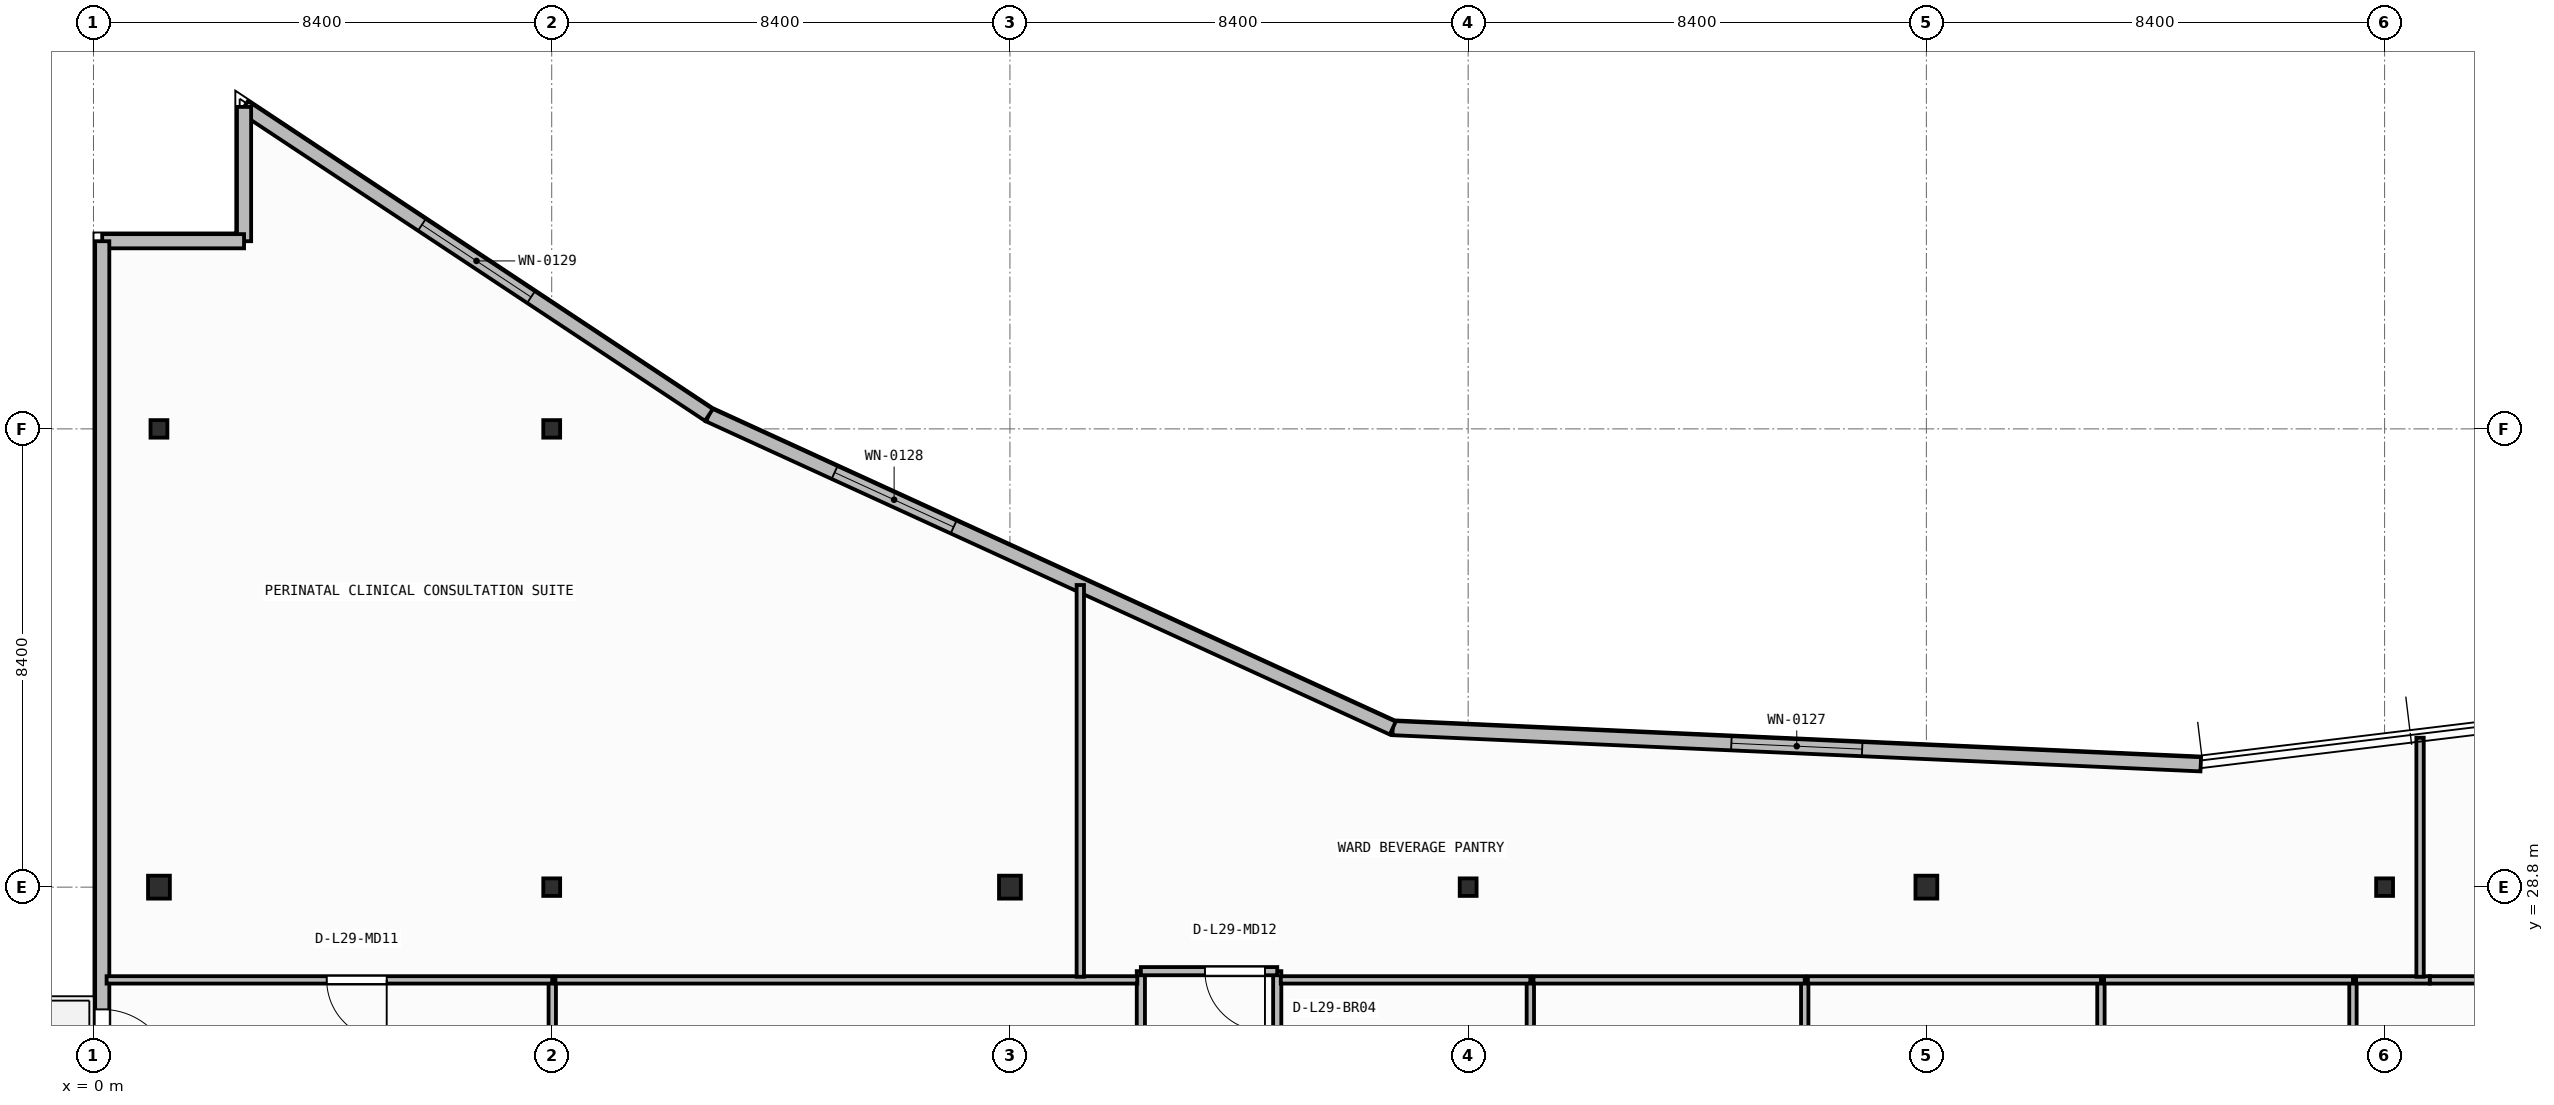
"""IFC4 building model, lengths in metres.
Left out: names, types, materials, properties, quantities, classifications, styles, units other than length and angle.
Written with IfcOpenShell. Run it as: python <this file> out.ifc"""

import sys

from ifc_helpers import new_model, si_unit, direction, frame, frame_2d, origin, origin_2d, place, context, subcontext, project, spatial, rectangle, i_section, extrude, element, fill, save


model = new_model("IFC4")
c1 = context("Model", 3, precision=1e-05, world=origin(), true_north=direction((0.0, 1.0)))
c2 = subcontext(c1, "Body", "Model", "MODEL_VIEW")
j1 = project(units=[si_unit("LENGTHUNIT", "METRE"), si_unit("PLANEANGLEUNIT", "RADIAN")], contexts=[c1])
p1 = place(None, origin())
s1 = spatial("IfcSite", under=j1, at=p1, CompositionType="ELEMENT")
p2 = place(p1, origin())
s2 = spatial("IfcBuilding", under=s1, at=p2, CompositionType="ELEMENT")
p3 = place(p2, frame((0.0, 0.0, 119.15)))
s3 = spatial("IfcBuildingStorey", under=s2, at=p3, CompositionType="ELEMENT", Elevation=119.15)
p4 = place(p3, frame((1.2, 28.8, 0.0), z_axis=(0.0, 0.0, 1.0), x_axis=(1.0, 0.0, 0.0)))
e1 = element("IfcColumn", 1, at=p4, inside=s3, PredefinedType="COLUMN", context=c2, shape_type="SweptSolid", body=[
    extrude(i_section(OverallWidth=0.4, OverallDepth=0.42, WebThickness=0.025, FlangeThickness=0.04, at=origin_2d()), origin(), (0.0, 0.0, 1.0), 3.95),
])
p5 = place(p3, frame((8.4, 28.8, 0.0), z_axis=(0.0, 0.0, 1.0), x_axis=(1.0, 0.0, 0.0)))
e2 = element("IfcColumn", 2, at=p5, inside=s3, PredefinedType="COLUMN", context=c2, shape_type="SweptSolid", body=[
    extrude(i_section(OverallWidth=0.309, OverallDepth=0.321, WebThickness=0.014, FlangeThickness=0.022, FilletRadius=0.017, at=origin_2d()), origin(), (0.0, 0.0, 1.0), 3.95),
])
p6 = place(p3, frame((16.8, 28.8, 0.0), z_axis=(0.0, 0.0, 1.0), x_axis=(1.0, 0.0, 0.0)))
e3 = element("IfcColumn", 3, at=p6, inside=s3, PredefinedType="COLUMN", context=c2, shape_type="SweptSolid", body=[
    extrude(i_section(OverallWidth=0.4, OverallDepth=0.42, WebThickness=0.025, FlangeThickness=0.04, at=origin_2d()), origin(), (0.0, 0.0, 1.0), 3.95),
])
p7 = place(p3, frame((25.2, 28.8, 0.0), z_axis=(0.0, 0.0, 1.0), x_axis=(1.0, 0.0, 0.0)))
e4 = element("IfcColumn", 4, at=p7, inside=s3, PredefinedType="COLUMN", context=c2, shape_type="SweptSolid", body=[
    extrude(i_section(OverallWidth=0.309, OverallDepth=0.321, WebThickness=0.014, FlangeThickness=0.022, FilletRadius=0.017, at=origin_2d()), origin(), (0.0, 0.0, 1.0), 3.95),
])
p8 = place(p3, frame((33.6, 28.8, 0.0), z_axis=(0.0, 0.0, 1.0), x_axis=(1.0, 0.0, 0.0)))
e5 = element("IfcColumn", 5, at=p8, inside=s3, PredefinedType="COLUMN", context=c2, shape_type="SweptSolid", body=[
    extrude(i_section(OverallWidth=0.4, OverallDepth=0.42, WebThickness=0.025, FlangeThickness=0.04, at=origin_2d()), origin(), (0.0, 0.0, 1.0), 3.95),
])
for number, where, z_axis, x_axis in (
    (6, (42.0, 28.8, 0.0), (0.0, 0.0, 1.0), (1.0, 0.0, 0.0)),
    (7, (1.2, 37.2, 0.0), (0.0, 0.0, 1.0), (1.0, 0.0, 0.0)),
    (8, (8.4, 37.2, 0.0), (0.0, 0.0, 1.0), (1.0, 0.0, 0.0)),
):
    element("IfcColumn", number, at=place(p3, frame(where, z_axis=z_axis, x_axis=x_axis)), inside=s3, PredefinedType="COLUMN", context=c2, shape_type="SweptSolid", body=[
        extrude(i_section(OverallWidth=0.309, OverallDepth=0.321, WebThickness=0.014, FlangeThickness=0.022, FilletRadius=0.017, at=origin_2d()), origin(), (0.0, 0.0, 1.0), 3.95),
    ])
p9 = place(p3, frame((38.63, 31.052, 0.0), z_axis=(0.0, 0.0, 1.0), x_axis=(-0.998996592956, 0.044786239663, 0.0)))
e9 = element("IfcWall", 9, at=p9, inside=s3, PredefinedType="STANDARD", context=c2, shape_type="SweptSolid", body=[
    extrude(rectangle(XDim=14.827, YDim=0.26, at=frame_2d((7.414, 0.0))), origin(), (0.0, 0.0, 1.0), 3.71),
])
p10 = place(p9, frame((6.214, 0.0, 0.9)))
e10 = element("IfcOpeningElement", 10, at=p10, cuts=e9, PredefinedType="OPENING", context=c2, shape_type="SweptSolid", body=[
    extrude(rectangle(XDim=2.4, YDim=1.65, at=frame_2d((1.2, 0.825))), frame((0.0, 0.14, 0.0), z_axis=(0.0, -1.0, 0.0), x_axis=(1.0, 0.0, 0.0)), (0.0, 0.0, 1.0), 0.28),
])
p11 = place(p3, frame((23.818, 31.716, 0.0), z_axis=(0.0, 0.0, 1.0), x_axis=(-0.909209527513, 0.416338846471, 0.0)))
e11 = element("IfcWall", 11, at=p11, inside=s3, PredefinedType="STANDARD", context=c2, shape_type="SweptSolid", body=[
    extrude(rectangle(XDim=13.787, YDim=0.26, at=frame_2d((6.894, 0.0))), origin(), (0.0, 0.0, 1.0), 3.71),
])
p12 = place(p11, frame((8.854, 0.0, 0.9)))
e12 = element("IfcOpeningElement", 12, at=p12, cuts=e11, PredefinedType="OPENING", context=c2, shape_type="SweptSolid", body=[
    extrude(rectangle(XDim=2.4, YDim=1.65, at=frame_2d((1.2, 0.825))), frame((0.0, 0.14, 0.0), z_axis=(0.0, -1.0, 0.0), x_axis=(1.0, 0.0, 0.0)), (0.0, 0.0, 1.0), 0.28),
])
p13 = place(p3, frame((11.282, 37.456, 0.0), z_axis=(0.0, 0.0, 1.0), x_axis=(-0.833630474253, 0.552322580017, 0.0)))
e13 = element("IfcWall", 13, at=p13, inside=s3, PredefinedType="STANDARD", context=c2, shape_type="SweptSolid", body=[
    extrude(rectangle(XDim=10.223, YDim=0.26, at=frame_2d((5.111, 0.0))), origin(), (0.0, 0.0, 1.0), 3.71),
])
p14 = place(p13, frame((3.911, 0.0, 0.9)))
e14 = element("IfcOpeningElement", 14, at=p14, cuts=e13, PredefinedType="OPENING", context=c2, shape_type="SweptSolid", body=[
    extrude(rectangle(XDim=2.4, YDim=1.65, at=frame_2d((1.2, 0.825))), frame((0.0, 0.14, 0.0), z_axis=(0.0, -1.0, 0.0), x_axis=(1.0, 0.0, 0.0)), (0.0, 0.0, 1.0), 0.28),
])
p15 = place(p3, frame((2.76, 43.102, 0.0), z_axis=(0.0, 0.0, 1.0), x_axis=(0.0, -1.0, 0.0)))
e15 = element("IfcWall", 15, at=p15, inside=s3, PredefinedType="STANDARD", context=c2, shape_type="SweptSolid", body=[
    extrude(rectangle(XDim=2.462, YDim=0.26, at=frame_2d((1.231, 0.0))), origin(), (0.0, 0.0, 1.0), 3.71),
])
p16 = place(p3, frame((2.76, 40.64, 0.0), z_axis=(0.0, 0.0, 1.0), x_axis=(-1.0, 0.0, 0.0)))
e16 = element("IfcWall", 16, at=p16, inside=s3, PredefinedType="STANDARD", context=c2, shape_type="SweptSolid", body=[
    extrude(rectangle(XDim=2.6, YDim=0.26, at=frame_2d((1.3, 0.0))), origin(), (0.0, 0.0, 1.0), 3.71),
])
p17 = place(p3, frame((0.16, 40.64, 0.0), z_axis=(0.0, 0.0, 1.0), x_axis=(0.0, -1.0, 0.0)))
e17 = element("IfcWall", 17, at=p17, inside=s3, PredefinedType="STANDARD", context=c2, shape_type="SweptSolid", body=[
    extrude(rectangle(XDim=37.88, YDim=0.26, at=frame_2d((18.94, 0.0))), origin(), (0.0, 0.0, 1.0), 3.71),
])
p18 = place(p17, frame((14.081, 0.0, 0.0)))
e18 = element("IfcOpeningElement", 18, at=p18, cuts=e17, PredefinedType="OPENING", context=c2, shape_type="SweptSolid", body=[
    extrude(rectangle(XDim=1.3, YDim=2.15, at=frame_2d((0.65, 1.075))), frame((0.0, 0.14, 0.0), z_axis=(0.0, -1.0, 0.0), x_axis=(1.0, 0.0, 0.0)), (0.0, 0.0, 1.0), 0.28),
])
p19 = place(p17, frame((21.856, 0.0, 0.9)))
e19 = element("IfcOpeningElement", 19, at=p19, cuts=e17, PredefinedType="OPENING", context=c2, shape_type="SweptSolid", body=[
    extrude(rectangle(XDim=2.4, YDim=1.65, at=frame_2d((1.2, 0.825))), frame((0.0, 0.14, 0.0), z_axis=(0.0, -1.0, 0.0), x_axis=(1.0, 0.0, 0.0)), (0.0, 0.0, 1.0), 0.28),
])
p20 = place(p3, frame((19.2, 27.26, 0.0), z_axis=(0.0, 0.0, 1.0), x_axis=(0.0, -1.0, 0.0)))
e20 = element("IfcWall", 20, at=p20, inside=s3, PredefinedType="PARTITIONING", context=c2, shape_type="SweptSolid", body=[
    extrude(rectangle(XDim=6.482, YDim=0.15, at=frame_2d((3.241, 0.0))), origin(), (0.0, 0.0, 1.0), 3.71),
])
p21 = place(p20, frame((2.068, 0.0, 0.0)))
e21 = element("IfcOpeningElement", 21, at=p21, cuts=e20, PredefinedType="OPENING", context=c2, shape_type="SweptSolid", body=[
    extrude(rectangle(XDim=1.1, YDim=2.1, at=frame_2d((0.55, 1.05))), frame((0.0, 0.085, 0.0), z_axis=(0.0, -1.0, 0.0), x_axis=(1.0, 0.0, 0.0)), (0.0, 0.0, 1.0), 0.17),
])
p22 = place(p3, frame((21.7, 23.784, 0.0), z_axis=(0.0, 0.0, 1.0), x_axis=(0.0, 1.0, 0.0)))
e22 = element("IfcWall", 22, at=p22, inside=s3, PredefinedType="PARTITIONING", context=c2, shape_type="SweptSolid", body=[
    extrude(rectangle(XDim=3.476, YDim=0.15, at=frame_2d((1.738, 0.0))), origin(), (0.0, 0.0, 1.0), 3.71),
])
p23 = place(p22, frame((1.088, 0.0, 0.0)))
e23 = element("IfcOpeningElement", 23, at=p23, cuts=e22, PredefinedType="OPENING", context=c2, shape_type="SweptSolid", body=[
    extrude(rectangle(XDim=1.3, YDim=2.15, at=frame_2d((0.65, 1.075))), frame((0.0, 0.085, 0.0), z_axis=(0.0, -1.0, 0.0), x_axis=(1.0, 0.0, 0.0)), (0.0, 0.0, 1.0), 0.17),
])
p24 = place(p3, frame((21.7, 27.26, 0.0), z_axis=(0.0, 0.0, 1.0), x_axis=(-1.0, 0.0, 0.0)))
e24 = element("IfcWall", 24, at=p24, inside=s3, PredefinedType="PARTITIONING", context=c2, shape_type="SweptSolid", body=[
    extrude(rectangle(XDim=2.5, YDim=0.15, at=frame_2d((1.25, 0.0))), origin(), (0.0, 0.0, 1.0), 3.71),
])
p25 = place(p24, frame((0.225, 0.0, 0.0)))
e25 = element("IfcOpeningElement", 25, at=p25, cuts=e24, PredefinedType="OPENING", context=c2, shape_type="SweptSolid", body=[
    extrude(rectangle(XDim=1.1, YDim=2.1, at=frame_2d((0.55, 1.05))), frame((0.0, 0.085, 0.0), z_axis=(0.0, -1.0, 0.0), x_axis=(1.0, 0.0, 0.0)), (0.0, 0.0, 1.0), 0.17),
])
p26 = place(p3, frame((8.41, 20.607, 0.0), z_axis=(0.0, 0.0, 1.0), x_axis=(0.0, 1.0, 0.0)))
e26 = element("IfcWall", 26, at=p26, inside=s3, PredefinedType="PARTITIONING", context=c2, shape_type="SweptSolid", body=[
    extrude(rectangle(XDim=6.493, YDim=0.135, at=frame_2d((3.246, 0.0))), origin(), (0.0, 0.0, 1.0), 3.152),
])
p27 = place(p3, frame((8.41, 27.1, 0.0), z_axis=(0.0, 0.0, 1.0), x_axis=(-1.0, 0.0, 0.0)))
e27 = element("IfcWall", 27, at=p27, inside=s3, PredefinedType="PARTITIONING", context=c2, shape_type="SweptSolid", body=[
    extrude(rectangle(XDim=8.17, YDim=0.135, at=frame_2d((4.085, 0.0))), origin(), (0.0, 0.0, 1.0), 3.71),
])
p28 = place(p27, frame((3.035, 0.0, 0.0)))
e28 = element("IfcOpeningElement", 28, at=p28, cuts=e27, PredefinedType="OPENING", context=c2, shape_type="SweptSolid", body=[
    extrude(rectangle(XDim=1.1, YDim=2.1, at=frame_2d((0.55, 1.05))), frame((0.0, 0.077, 0.0), z_axis=(0.0, -1.0, 0.0), x_axis=(1.0, 0.0, 0.0)), (0.0, 0.0, 1.0), 0.155),
])
p29 = place(p3, frame((19.135, 27.1, 0.0), z_axis=(0.0, 0.0, 1.0), x_axis=(-1.0, 0.0, 0.0)))
e29 = element("IfcWall", 29, at=p29, inside=s3, PredefinedType="PARTITIONING", context=c2, shape_type="SweptSolid", body=[
    extrude(rectangle(XDim=10.667, YDim=0.135, at=frame_2d((5.334, 0.0))), origin(), (0.0, 0.0, 1.0), 3.71),
])
p30 = place(p3, frame((26.34, 23.802, 0.0), z_axis=(0.0, 0.0, 1.0), x_axis=(0.0, 1.0, 0.0)))
e30 = element("IfcWall", 30, at=p30, inside=s3, PredefinedType="PARTITIONING", context=c2, shape_type="SweptSolid", body=[
    extrude(rectangle(XDim=3.298, YDim=0.135, at=frame_2d((1.649, 0.0))), origin(), (0.0, 0.0, 1.0), 3.71),
])
p31 = place(p3, frame((26.34, 27.1, 0.0), z_axis=(0.0, 0.0, 1.0), x_axis=(-1.0, 0.0, 0.0)))
e31 = element("IfcWall", 31, at=p31, inside=s3, PredefinedType="PARTITIONING", context=c2, shape_type="SweptSolid", body=[
    extrude(rectangle(XDim=4.575, YDim=0.135, at=frame_2d((2.288, 0.0))), origin(), (0.0, 0.0, 1.0), 3.71),
])
p32 = place(p3, frame((31.37, 23.802, 0.0), z_axis=(0.0, 0.0, 1.0), x_axis=(0.0, 1.0, 0.0)))
e32 = element("IfcWall", 32, at=p32, inside=s3, PredefinedType="PARTITIONING", context=c2, shape_type="SweptSolid", body=[
    extrude(rectangle(XDim=3.298, YDim=0.135, at=frame_2d((1.649, 0.0))), origin(), (0.0, 0.0, 1.0), 3.71),
])
p33 = place(p3, frame((31.37, 27.1, 0.0), z_axis=(0.0, 0.0, 1.0), x_axis=(-1.0, 0.0, 0.0)))
e33 = element("IfcWall", 33, at=p33, inside=s3, PredefinedType="PARTITIONING", context=c2, shape_type="SweptSolid", body=[
    extrude(rectangle(XDim=4.973, YDim=0.135, at=frame_2d((2.486, 0.0))), origin(), (0.0, 0.0, 1.0), 3.71),
])
p34 = place(p3, frame((36.8, 20.715, 0.0), z_axis=(0.0, 0.0, 1.0), x_axis=(0.0, 1.0, 0.0)))
e34 = element("IfcWall", 34, at=p34, inside=s3, PredefinedType="PARTITIONING", context=c2, shape_type="SweptSolid", body=[
    extrude(rectangle(XDim=6.385, YDim=0.135, at=frame_2d((3.192, 0.0))), origin(), (0.0, 0.0, 1.0), 3.71),
])
p35 = place(p3, frame((36.8, 27.1, 0.0), z_axis=(0.0, 0.0, 1.0), x_axis=(-1.0, 0.0, 0.0)))
e35 = element("IfcWall", 35, at=p35, inside=s3, PredefinedType="PARTITIONING", context=c2, shape_type="SweptSolid", body=[
    extrude(rectangle(XDim=5.373, YDim=0.135, at=frame_2d((2.686, 0.0))), origin(), (0.0, 0.0, 1.0), 3.71),
])
p36 = place(p3, frame((41.42, 20.715, 0.0), z_axis=(0.0, 0.0, 1.0), x_axis=(0.0, 1.0, 0.0)))
e36 = element("IfcWall", 36, at=p36, inside=s3, PredefinedType="PARTITIONING", context=c2, shape_type="SweptSolid", body=[
    extrude(rectangle(XDim=6.385, YDim=0.135, at=frame_2d((3.192, 0.0))), origin(), (0.0, 0.0, 1.0), 3.71),
])
p37 = place(p3, frame((41.42, 27.1, 0.0), z_axis=(0.0, 0.0, 1.0), x_axis=(-1.0, 0.0, 0.0)))
e37 = element("IfcWall", 37, at=p37, inside=s3, PredefinedType="PARTITIONING", context=c2, shape_type="SweptSolid", body=[
    extrude(rectangle(XDim=4.562, YDim=0.135, at=frame_2d((2.281, 0.0))), origin(), (0.0, 0.0, 1.0), 3.71),
])
p38 = place(p3, frame((42.829, 27.1, 0.0), z_axis=(0.0, 0.0, 1.0), x_axis=(-1.0, 0.0, 0.0)))
e38 = element("IfcWall", 38, at=p38, inside=s3, PredefinedType="PARTITIONING", context=c2, shape_type="SweptSolid", body=[
    extrude(rectangle(XDim=1.351, YDim=0.135, at=frame_2d((0.676, 0.0))), origin(), (0.0, 0.0, 1.0), 3.71),
])
p39 = place(p3, frame((46.45, 27.1, 0.0), z_axis=(0.0, 0.0, 1.0), x_axis=(-1.0, 0.0, 0.0)))
e39 = element("IfcWall", 39, at=p39, inside=s3, PredefinedType="PARTITIONING", context=c2, shape_type="SweptSolid", body=[
    extrude(rectangle(XDim=3.619, YDim=0.135, at=frame_2d((1.81, 0.0))), origin(), (0.0, 0.0, 1.0), 3.71),
])
p40 = place(p39, frame((0.253, 0.0, 0.0)))
e40 = element("IfcOpeningElement", 40, at=p40, cuts=e39, PredefinedType="OPENING", context=c2, shape_type="SweptSolid", body=[
    extrude(rectangle(XDim=1.1, YDim=2.1, at=frame_2d((0.55, 1.05))), frame((0.0, 0.077, 0.0), z_axis=(0.0, -1.0, 0.0), x_axis=(1.0, 0.0, 0.0)), (0.0, 0.0, 1.0), 0.155),
])
p41 = place(p3, frame((18.09, 27.157, 0.0), z_axis=(0.0, 0.0, 1.0), x_axis=(0.0, 1.0, 0.0)))
e41 = element("IfcWall", 41, at=p41, inside=s3, PredefinedType="PARTITIONING", context=c2, shape_type="SweptSolid", body=[
    extrude(rectangle(XDim=7.181, YDim=0.135, at=frame_2d((3.59, 0.0))), origin(), (0.0, 0.0, 1.0), 3.71),
])
p42 = place(p3, frame((42.65, 27.157, 0.0), z_axis=(0.0, 0.0, 1.0), x_axis=(0.0, 1.0, 0.0)))
e42 = element("IfcWall", 42, at=p42, inside=s3, PredefinedType="PARTITIONING", context=c2, shape_type="SweptSolid", body=[
    extrude(rectangle(XDim=4.381, YDim=0.135, at=frame_2d((2.191, 0.0))), origin(), (0.0, 0.0, 1.0), 3.71),
])
p43 = place(p10, origin())
e43 = element("IfcWindow", 43, at=p43, inside=s3, PartitioningType="SINGLE_PANEL", PredefinedType="WINDOW", context=c2, shape_type="SweptSolid", body=[
    extrude(rectangle(XDim=2.4, YDim=1.65, at=frame_2d((1.2, 0.825))), frame((0.0, 0.03, 0.0), z_axis=(0.0, -1.0, 0.0), x_axis=(1.0, 0.0, 0.0)), (0.0, 0.0, 1.0), 0.06),
])
fill(e10, e43)
p44 = place(p12, origin())
e44 = element("IfcWindow", 44, at=p44, inside=s3, PartitioningType="SINGLE_PANEL", PredefinedType="WINDOW", context=c2, shape_type="SweptSolid", body=[
    extrude(rectangle(XDim=2.4, YDim=1.65, at=frame_2d((1.2, 0.825))), frame((0.0, 0.03, 0.0), z_axis=(0.0, -1.0, 0.0), x_axis=(1.0, 0.0, 0.0)), (0.0, 0.0, 1.0), 0.06),
])
fill(e12, e44)
p45 = place(p14, origin())
e45 = element("IfcWindow", 45, at=p45, inside=s3, PartitioningType="SINGLE_PANEL", PredefinedType="WINDOW", context=c2, shape_type="SweptSolid", body=[
    extrude(rectangle(XDim=2.4, YDim=1.65, at=frame_2d((1.2, 0.825))), frame((0.0, 0.03, 0.0), z_axis=(0.0, -1.0, 0.0), x_axis=(1.0, 0.0, 0.0)), (0.0, 0.0, 1.0), 0.06),
])
fill(e14, e45)
p46 = place(p18, origin())
e46 = element("IfcDoor", 46, at=p46, inside=s3, OperationType="SINGLE_SWING_RIGHT", PredefinedType="DOOR", context=c2, shape_type="SweptSolid", body=[
    extrude(rectangle(XDim=1.3, YDim=2.15, at=frame_2d((0.65, 1.075))), frame((0.0, 0.025, 0.0), z_axis=(0.0, -1.0, 0.0), x_axis=(1.0, 0.0, 0.0)), (0.0, 0.0, 1.0), 0.05),
])
fill(e18, e46)
p47 = place(p25, origin())
e47 = element("IfcDoor", 47, at=p47, inside=s3, OperationType="SINGLE_SWING_LEFT", PredefinedType="DOOR", context=c2, shape_type="SweptSolid", body=[
    extrude(rectangle(XDim=1.1, YDim=2.1, at=frame_2d((0.55, 1.05))), frame((0.0, 0.025, 0.0), z_axis=(0.0, -1.0, 0.0), x_axis=(1.0, 0.0, 0.0)), (0.0, 0.0, 1.0), 0.05),
])
fill(e25, e47)
p48 = place(p28, origin())
e48 = element("IfcDoor", 48, at=p48, inside=s3, OperationType="SINGLE_SWING_LEFT", PredefinedType="DOOR", context=c2, shape_type="SweptSolid", body=[
    extrude(rectangle(XDim=1.1, YDim=2.1, at=frame_2d((0.55, 1.05))), frame((0.0, 0.025, 0.0), z_axis=(0.0, -1.0, 0.0), x_axis=(1.0, 0.0, 0.0)), (0.0, 0.0, 1.0), 0.05),
])
fill(e28, e48)
save(model, sys.argv[1])
